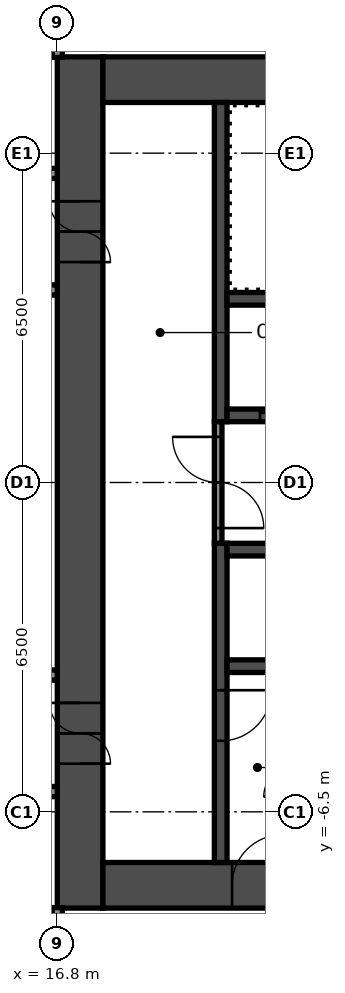
"""IFC4 building model, lengths in metres.
Left out: names, types, materials, properties, quantities, classifications, styles, units other than length and angle.
Written with IfcOpenShell. Run it as: python <this file> out.ifc"""

import sys

from ifc_helpers import new_model, si_unit, direction, frame, frame_2d, origin, place, context, subcontext, project, spatial, rectangle, extrude, element, fill, save


model = new_model("IFC4")
c1 = context("Model", 3, precision=1e-05, world=origin(), true_north=direction((0.0, 1.0)))
c2 = subcontext(c1, "Body", "Model", "MODEL_VIEW")
j1 = project(units=[si_unit("LENGTHUNIT", "METRE"), si_unit("PLANEANGLEUNIT", "RADIAN")], contexts=[c1])
p1 = place(None, origin())
s1 = spatial("IfcSite", under=j1, at=p1, CompositionType="ELEMENT")
p2 = place(p1, origin())
s2 = spatial("IfcBuilding", under=s1, at=p2, CompositionType="ELEMENT")
p3 = place(p2, frame((0.0, 0.0, 23.0)))
s3 = spatial("IfcBuildingStorey", under=s2, at=p3, CompositionType="ELEMENT", Elevation=23.0)
p4 = place(p3, frame((17.25, -8.4, 0.0), z_axis=(0.0, 0.0, 1.0), x_axis=(0.0, 1.0, 0.0)))
e1 = element("IfcWall", 1, at=p4, inside=s3, PredefinedType="SHEAR", context=c2, shape_type="SweptSolid", body=[
    extrude(rectangle(XDim=16.8, YDim=0.9, at=frame_2d((8.4, 0.0))), origin(), (0.0, 0.0, 1.0), 2.8),
])
p5 = place(p4, frame((12.75, 0.0, 0.0)))
e2 = element("IfcOpeningElement", 2, at=p5, cuts=e1, PredefinedType="OPENING", context=c2, shape_type="SweptSolid", body=[
    extrude(rectangle(XDim=1.2, YDim=2.1, at=frame_2d((0.6, 1.05))), frame((0.0, 0.46, 0.0), z_axis=(0.0, -1.0, 0.0), x_axis=(1.0, 0.0, 0.0)), (0.0, 0.0, 1.0), 0.92),
])
p6 = place(p4, frame((2.85, 0.0, 0.0)))
e3 = element("IfcOpeningElement", 3, at=p6, cuts=e1, PredefinedType="OPENING", context=c2, shape_type="SweptSolid", body=[
    extrude(rectangle(XDim=1.2, YDim=2.1, at=frame_2d((0.6, 1.05))), frame((0.0, 0.46, 0.0), z_axis=(0.0, -1.0, 0.0), x_axis=(1.0, 0.0, 0.0)), (0.0, 0.0, 1.0), 0.92),
])
p7 = place(p3, frame((17.7, 7.95, 0.0), z_axis=(0.0, 0.0, 1.0), x_axis=(1.0, 0.0, 0.0)))
e4 = element("IfcWall", 4, at=p7, inside=s3, PredefinedType="SHEAR", context=c2, shape_type="SweptSolid", body=[
    extrude(rectangle(XDim=15.0, YDim=0.9, at=frame_2d((7.5, 0.0))), origin(), (0.0, 0.0, 1.0), 2.8),
])
p8 = place(p7, frame((10.4, 0.0, 0.0)))
e5 = element("IfcOpeningElement", 5, at=p8, cuts=e4, PredefinedType="OPENING", context=c2, shape_type="SweptSolid", body=[
    extrude(rectangle(XDim=1.2, YDim=2.1, at=frame_2d((0.6, 1.05))), frame((0.0, 0.46, 0.0), z_axis=(0.0, -1.0, 0.0), x_axis=(1.0, 0.0, 0.0)), (0.0, 0.0, 1.0), 0.92),
])
p9 = place(p7, frame((13.35, 0.0, 0.0)))
e6 = element("IfcOpeningElement", 6, at=p9, cuts=e4, PredefinedType="OPENING", context=c2, shape_type="SweptSolid", body=[
    extrude(rectangle(XDim=0.9, YDim=2.1, at=frame_2d((0.45, 1.05))), frame((0.0, 0.46, 0.0), z_axis=(0.0, -1.0, 0.0), x_axis=(1.0, 0.0, 0.0)), (0.0, 0.0, 1.0), 0.92),
])
p10 = place(p3, frame((17.7, -7.95, 0.0), z_axis=(0.0, 0.0, 1.0), x_axis=(1.0, 0.0, 0.0)))
e7 = element("IfcWall", 7, at=p10, inside=s3, PredefinedType="SHEAR", context=c2, shape_type="SweptSolid", body=[
    extrude(rectangle(XDim=15.0, YDim=0.9, at=frame_2d((7.5, 0.0))), origin(), (0.0, 0.0, 1.0), 2.8),
])
p11 = place(p10, frame((2.55, 0.0, 0.0)))
e8 = element("IfcOpeningElement", 8, at=p11, cuts=e7, PredefinedType="OPENING", context=c2, shape_type="SweptSolid", body=[
    extrude(rectangle(XDim=1.0, YDim=2.1, at=frame_2d((0.5, 1.05))), frame((0.0, 0.46, 0.0), z_axis=(0.0, -1.0, 0.0), x_axis=(1.0, 0.0, 0.0)), (0.0, 0.0, 1.0), 0.92),
])
p12 = place(p3, frame((20.025, 1.2, 0.0), z_axis=(0.0, 0.0, 1.0), x_axis=(0.0, 1.0, 0.0)))
e9 = element("IfcWall", 9, at=p12, inside=s3, PredefinedType="SHEAR", context=c2, shape_type="SweptSolid", body=[
    extrude(rectangle(XDim=6.3, YDim=0.25, at=frame_2d((3.15, 0.0))), origin(), (0.0, 0.0, 1.0), 2.8),
])
p13 = place(p3, frame((20.025, -7.5, 0.0), z_axis=(0.0, 0.0, 1.0), x_axis=(0.0, 1.0, 0.0)))
e10 = element("IfcWall", 10, at=p13, inside=s3, PredefinedType="SHEAR", context=c2, shape_type="SweptSolid", body=[
    extrude(rectangle(XDim=6.3, YDim=0.25, at=frame_2d((3.15, 0.0))), origin(), (0.0, 0.0, 1.0), 2.8),
])
p14 = place(p13, frame((2.4, 0.0, 0.0)))
e11 = element("IfcOpeningElement", 11, at=p14, cuts=e10, PredefinedType="OPENING", context=c2, shape_type="SweptSolid", body=[
    extrude(rectangle(XDim=1.0, YDim=2.1, at=frame_2d((0.5, 1.05))), frame((0.0, 0.135, 0.0), z_axis=(0.0, -1.0, 0.0), x_axis=(1.0, 0.0, 0.0)), (0.0, 0.0, 1.0), 0.27),
])
p15 = place(p3, frame((20.15, 1.325, 0.0), z_axis=(0.0, 0.0, 1.0), x_axis=(1.0, 0.0, 0.0)))
e12 = element("IfcWall", 12, at=p15, inside=s3, PredefinedType="SHEAR", context=c2, shape_type="SweptSolid", body=[
    extrude(rectangle(XDim=7.5, YDim=0.25, at=frame_2d((3.75, 0.0))), origin(), (0.0, 0.0, 1.0), 2.8),
])
p16 = place(p15, frame((0.65, 0.0, 0.0)))
e13 = element("IfcOpeningElement", 13, at=p16, cuts=e12, PredefinedType="OPENING", context=c2, shape_type="SweptSolid", body=[
    extrude(rectangle(XDim=1.1, YDim=2.1, at=frame_2d((0.55, 1.05))), frame((0.0, 0.135, 0.0), z_axis=(0.0, -1.0, 0.0), x_axis=(1.0, 0.0, 0.0)), (0.0, 0.0, 1.0), 0.27),
])
p17 = place(p15, frame((3.05, 0.0, 0.0)))
e14 = element("IfcOpeningElement", 14, at=p17, cuts=e12, PredefinedType="OPENING", context=c2, shape_type="SweptSolid", body=[
    extrude(rectangle(XDim=1.1, YDim=2.1, at=frame_2d((0.55, 1.05))), frame((0.0, 0.135, 0.0), z_axis=(0.0, -1.0, 0.0), x_axis=(1.0, 0.0, 0.0)), (0.0, 0.0, 1.0), 0.27),
])
p18 = place(p15, frame((5.45, 0.0, 0.0)))
e15 = element("IfcOpeningElement", 15, at=p18, cuts=e12, PredefinedType="OPENING", context=c2, shape_type="SweptSolid", body=[
    extrude(rectangle(XDim=1.1, YDim=2.1, at=frame_2d((0.55, 1.05))), frame((0.0, 0.135, 0.0), z_axis=(0.0, -1.0, 0.0), x_axis=(1.0, 0.0, 0.0)), (0.0, 0.0, 1.0), 0.27),
])
for number, where, z_axis, x_axis in (
    (16, (20.15, 3.625, 0.0), (0.0, 0.0, 1.0), (1.0, 0.0, 0.0)),
    (17, (20.15, -1.325, 0.0), (0.0, 0.0, 1.0), (1.0, 0.0, 0.0)),
    (18, (20.15, -3.625, 0.0), (0.0, 0.0, 1.0), (1.0, 0.0, 0.0)),
):
    element("IfcWall", number, at=place(p3, frame(where, z_axis=z_axis, x_axis=x_axis)), inside=s3, PredefinedType="SHEAR", context=c2, shape_type="SweptSolid", body=[
        extrude(rectangle(XDim=7.5, YDim=0.25, at=frame_2d((3.75, 0.0))), origin(), (0.0, 0.0, 1.0), 2.8),
    ])
p19 = place(p3, frame((19.975, -1.2, 0.0), z_axis=(0.0, 0.0, 1.0), x_axis=(0.0, 1.0, 0.0)))
e19 = element("IfcWall", 19, at=p19, inside=s3, PredefinedType="PARTITIONING", context=c2, shape_type="SweptSolid", body=[
    extrude(rectangle(XDim=2.4, YDim=0.15, at=frame_2d((1.2, 0.0))), origin(), (0.0, 0.0, 1.0), 2.8),
])
p20 = place(p19, frame((0.3, 0.0, 0.0)))
e20 = element("IfcOpeningElement", 20, at=p20, cuts=e19, PredefinedType="OPENING", context=c2, shape_type="SweptSolid", body=[
    extrude(rectangle(XDim=1.8, YDim=2.1, at=frame_2d((0.9, 1.05))), frame((0.0, 0.085, 0.0), z_axis=(0.0, -1.0, 0.0), x_axis=(1.0, 0.0, 0.0)), (0.0, 0.0, 1.0), 0.17),
])
p21 = place(p3, frame((-16.8, -6.1, 0.0), z_axis=(0.0, 0.0, 1.0), x_axis=(1.0, 0.0, 0.0)))
e21 = element("IfcWall", 21, at=p21, inside=s3, PredefinedType="PARTITIONING", context=c2, shape_type="SweptSolid", body=[
    extrude(rectangle(XDim=33.6, YDim=0.2, at=frame_2d((16.8, 0.0))), origin(), (0.0, 0.0, 1.0), 2.8),
])
p22 = place(p21, frame((2.85, 0.0, 0.0)))
e22 = element("IfcOpeningElement", 22, at=p22, cuts=e21, PredefinedType="OPENING", context=c2, shape_type="SweptSolid", body=[
    extrude(rectangle(XDim=1.0, YDim=2.1, at=frame_2d((0.5, 1.05))), frame((0.0, 0.11, 0.0), z_axis=(0.0, -1.0, 0.0), x_axis=(1.0, 0.0, 0.0)), (0.0, 0.0, 1.0), 0.22),
])
p23 = place(p21, frame((4.55, 0.0, 0.0)))
e23 = element("IfcOpeningElement", 23, at=p23, cuts=e21, PredefinedType="OPENING", context=c2, shape_type="SweptSolid", body=[
    extrude(rectangle(XDim=1.0, YDim=2.1, at=frame_2d((0.5, 1.05))), frame((0.0, 0.11, 0.0), z_axis=(0.0, -1.0, 0.0), x_axis=(1.0, 0.0, 0.0)), (0.0, 0.0, 1.0), 0.22),
])
p24 = place(p21, frame((11.25, 0.0, 0.0)))
e24 = element("IfcOpeningElement", 24, at=p24, cuts=e21, PredefinedType="OPENING", context=c2, shape_type="SweptSolid", body=[
    extrude(rectangle(XDim=1.0, YDim=2.1, at=frame_2d((0.5, 1.05))), frame((0.0, 0.11, 0.0), z_axis=(0.0, -1.0, 0.0), x_axis=(1.0, 0.0, 0.0)), (0.0, 0.0, 1.0), 0.22),
])
p25 = place(p21, frame((12.95, 0.0, 0.0)))
e25 = element("IfcOpeningElement", 25, at=p25, cuts=e21, PredefinedType="OPENING", context=c2, shape_type="SweptSolid", body=[
    extrude(rectangle(XDim=1.0, YDim=2.1, at=frame_2d((0.5, 1.05))), frame((0.0, 0.11, 0.0), z_axis=(0.0, -1.0, 0.0), x_axis=(1.0, 0.0, 0.0)), (0.0, 0.0, 1.0), 0.22),
])
p26 = place(p21, frame((20.5, 0.0, 0.0)))
e26 = element("IfcOpeningElement", 26, at=p26, cuts=e21, PredefinedType="OPENING", context=c2, shape_type="SweptSolid", body=[
    extrude(rectangle(XDim=1.0, YDim=2.1, at=frame_2d((0.5, 1.05))), frame((0.0, 0.11, 0.0), z_axis=(0.0, -1.0, 0.0), x_axis=(1.0, 0.0, 0.0)), (0.0, 0.0, 1.0), 0.22),
])
p27 = place(p21, frame((28.05, 0.0, 0.0)))
e27 = element("IfcOpeningElement", 27, at=p27, cuts=e21, PredefinedType="OPENING", context=c2, shape_type="SweptSolid", body=[
    extrude(rectangle(XDim=1.0, YDim=2.1, at=frame_2d((0.5, 1.05))), frame((0.0, 0.11, 0.0), z_axis=(0.0, -1.0, 0.0), x_axis=(1.0, 0.0, 0.0)), (0.0, 0.0, 1.0), 0.22),
])
p28 = place(p21, frame((29.75, 0.0, 0.0)))
e28 = element("IfcOpeningElement", 28, at=p28, cuts=e21, PredefinedType="OPENING", context=c2, shape_type="SweptSolid", body=[
    extrude(rectangle(XDim=1.0, YDim=2.1, at=frame_2d((0.5, 1.05))), frame((0.0, 0.11, 0.0), z_axis=(0.0, -1.0, 0.0), x_axis=(1.0, 0.0, 0.0)), (0.0, 0.0, 1.0), 0.22),
])
p29 = place(p3, frame((-16.8, -3.8, 0.0), z_axis=(0.0, 0.0, 1.0), x_axis=(1.0, 0.0, 0.0)))
e29 = element("IfcWall", 29, at=p29, inside=s3, PredefinedType="PARTITIONING", context=c2, shape_type="SweptSolid", body=[
    extrude(rectangle(XDim=33.6, YDim=0.2, at=frame_2d((16.8, 0.0))), origin(), (0.0, 0.0, 1.0), 2.8),
])
p30 = place(p29, frame((10.64, 0.0, 0.0)))
e30 = element("IfcOpeningElement", 30, at=p30, cuts=e29, PredefinedType="OPENING", context=c2, shape_type="SweptSolid", body=[
    extrude(rectangle(XDim=0.9, YDim=2.1, at=frame_2d((0.45, 1.05))), frame((0.0, 0.11, 0.0), z_axis=(0.0, -1.0, 0.0), x_axis=(1.0, 0.0, 0.0)), (0.0, 0.0, 1.0), 0.22),
])
p31 = place(p29, frame((14.84, 0.0, 0.0)))
e31 = element("IfcOpeningElement", 31, at=p31, cuts=e29, PredefinedType="OPENING", context=c2, shape_type="SweptSolid", body=[
    extrude(rectangle(XDim=0.9, YDim=2.1, at=frame_2d((0.45, 1.05))), frame((0.0, 0.11, 0.0), z_axis=(0.0, -1.0, 0.0), x_axis=(1.0, 0.0, 0.0)), (0.0, 0.0, 1.0), 0.22),
])
p32 = place(p29, frame((26.26, 0.0, 0.0)))
e32 = element("IfcOpeningElement", 32, at=p32, cuts=e29, PredefinedType="OPENING", context=c2, shape_type="SweptSolid", body=[
    extrude(rectangle(XDim=0.9, YDim=2.1, at=frame_2d((0.45, 1.05))), frame((0.0, 0.11, 0.0), z_axis=(0.0, -1.0, 0.0), x_axis=(1.0, 0.0, 0.0)), (0.0, 0.0, 1.0), 0.22),
])
p33 = place(p29, frame((30.46, 0.0, 0.0)))
e33 = element("IfcOpeningElement", 33, at=p33, cuts=e29, PredefinedType="OPENING", context=c2, shape_type="SweptSolid", body=[
    extrude(rectangle(XDim=0.9, YDim=2.1, at=frame_2d((0.45, 1.05))), frame((0.0, 0.11, 0.0), z_axis=(0.0, -1.0, 0.0), x_axis=(1.0, 0.0, 0.0)), (0.0, 0.0, 1.0), 0.22),
])
p34 = place(p3, frame((-16.8, 3.8, 0.0), z_axis=(0.0, 0.0, 1.0), x_axis=(1.0, 0.0, 0.0)))
e34 = element("IfcWall", 34, at=p34, inside=s3, PredefinedType="PARTITIONING", context=c2, shape_type="SweptSolid", body=[
    extrude(rectangle(XDim=33.6, YDim=0.2, at=frame_2d((16.8, 0.0))), origin(), (0.0, 0.0, 1.0), 2.8),
])
p35 = place(p34, frame((2.155, 0.0, 0.0)))
e35 = element("IfcOpeningElement", 35, at=p35, cuts=e34, PredefinedType="OPENING", context=c2, shape_type="SweptSolid", body=[
    extrude(rectangle(XDim=0.9, YDim=2.1, at=frame_2d((0.45, 1.05))), frame((0.0, 0.11, 0.0), z_axis=(0.0, -1.0, 0.0), x_axis=(1.0, 0.0, 0.0)), (0.0, 0.0, 1.0), 0.22),
])
p36 = place(p34, frame((6.355, 0.0, 0.0)))
e36 = element("IfcOpeningElement", 36, at=p36, cuts=e34, PredefinedType="OPENING", context=c2, shape_type="SweptSolid", body=[
    extrude(rectangle(XDim=0.9, YDim=2.1, at=frame_2d((0.45, 1.05))), frame((0.0, 0.11, 0.0), z_axis=(0.0, -1.0, 0.0), x_axis=(1.0, 0.0, 0.0)), (0.0, 0.0, 1.0), 0.22),
])
p37 = place(p34, frame((18.28, 0.0, 0.0)))
e37 = element("IfcOpeningElement", 37, at=p37, cuts=e34, PredefinedType="OPENING", context=c2, shape_type="SweptSolid", body=[
    extrude(rectangle(XDim=0.9, YDim=2.1, at=frame_2d((0.45, 1.05))), frame((0.0, 0.11, 0.0), z_axis=(0.0, -1.0, 0.0), x_axis=(1.0, 0.0, 0.0)), (0.0, 0.0, 1.0), 0.22),
])
p38 = place(p34, frame((22.48, 0.0, 0.0)))
e38 = element("IfcOpeningElement", 38, at=p38, cuts=e34, PredefinedType="OPENING", context=c2, shape_type="SweptSolid", body=[
    extrude(rectangle(XDim=0.9, YDim=2.1, at=frame_2d((0.45, 1.05))), frame((0.0, 0.11, 0.0), z_axis=(0.0, -1.0, 0.0), x_axis=(1.0, 0.0, 0.0)), (0.0, 0.0, 1.0), 0.22),
])
p39 = place(p3, frame((-16.8, 6.1, 0.0), z_axis=(0.0, 0.0, 1.0), x_axis=(1.0, 0.0, 0.0)))
e39 = element("IfcWall", 39, at=p39, inside=s3, PredefinedType="PARTITIONING", context=c2, shape_type="SweptSolid", body=[
    extrude(rectangle(XDim=33.6, YDim=0.2, at=frame_2d((16.8, 0.0))), origin(), (0.0, 0.0, 1.0), 2.8),
])
p40 = place(p39, frame((2.85, 0.0, 0.0)))
e40 = element("IfcOpeningElement", 40, at=p40, cuts=e39, PredefinedType="OPENING", context=c2, shape_type="SweptSolid", body=[
    extrude(rectangle(XDim=1.0, YDim=2.1, at=frame_2d((0.5, 1.05))), frame((0.0, 0.11, 0.0), z_axis=(0.0, -1.0, 0.0), x_axis=(1.0, 0.0, 0.0)), (0.0, 0.0, 1.0), 0.22),
])
p41 = place(p39, frame((4.55, 0.0, 0.0)))
e41 = element("IfcOpeningElement", 41, at=p41, cuts=e39, PredefinedType="OPENING", context=c2, shape_type="SweptSolid", body=[
    extrude(rectangle(XDim=1.0, YDim=2.1, at=frame_2d((0.5, 1.05))), frame((0.0, 0.11, 0.0), z_axis=(0.0, -1.0, 0.0), x_axis=(1.0, 0.0, 0.0)), (0.0, 0.0, 1.0), 0.22),
])
p42 = place(p39, frame((9.545, 0.0, 0.0)))
e42 = element("IfcOpeningElement", 42, at=p42, cuts=e39, PredefinedType="OPENING", context=c2, shape_type="SweptSolid", body=[
    extrude(rectangle(XDim=0.9, YDim=2.1, at=frame_2d((0.45, 1.05))), frame((0.0, 0.11, 0.0), z_axis=(0.0, -1.0, 0.0), x_axis=(1.0, 0.0, 0.0)), (0.0, 0.0, 1.0), 0.22),
])
p43 = place(p39, frame((13.745, 0.0, 0.0)))
e43 = element("IfcOpeningElement", 43, at=p43, cuts=e39, PredefinedType="OPENING", context=c2, shape_type="SweptSolid", body=[
    extrude(rectangle(XDim=0.9, YDim=2.1, at=frame_2d((0.45, 1.05))), frame((0.0, 0.11, 0.0), z_axis=(0.0, -1.0, 0.0), x_axis=(1.0, 0.0, 0.0)), (0.0, 0.0, 1.0), 0.22),
])
p44 = place(p39, frame((19.65, 0.0, 0.0)))
e44 = element("IfcOpeningElement", 44, at=p44, cuts=e39, PredefinedType="OPENING", context=c2, shape_type="SweptSolid", body=[
    extrude(rectangle(XDim=1.0, YDim=2.1, at=frame_2d((0.5, 1.05))), frame((0.0, 0.11, 0.0), z_axis=(0.0, -1.0, 0.0), x_axis=(1.0, 0.0, 0.0)), (0.0, 0.0, 1.0), 0.22),
])
p45 = place(p39, frame((21.35, 0.0, 0.0)))
e45 = element("IfcOpeningElement", 45, at=p45, cuts=e39, PredefinedType="OPENING", context=c2, shape_type="SweptSolid", body=[
    extrude(rectangle(XDim=1.0, YDim=2.1, at=frame_2d((0.5, 1.05))), frame((0.0, 0.11, 0.0), z_axis=(0.0, -1.0, 0.0), x_axis=(1.0, 0.0, 0.0)), (0.0, 0.0, 1.0), 0.22),
])
p46 = place(p39, frame((28.05, 0.0, 0.0)))
e46 = element("IfcOpeningElement", 46, at=p46, cuts=e39, PredefinedType="OPENING", context=c2, shape_type="SweptSolid", body=[
    extrude(rectangle(XDim=1.0, YDim=2.1, at=frame_2d((0.5, 1.05))), frame((0.0, 0.11, 0.0), z_axis=(0.0, -1.0, 0.0), x_axis=(1.0, 0.0, 0.0)), (0.0, 0.0, 1.0), 0.22),
])
p47 = place(p39, frame((29.75, 0.0, 0.0)))
e47 = element("IfcOpeningElement", 47, at=p47, cuts=e39, PredefinedType="OPENING", context=c2, shape_type="SweptSolid", body=[
    extrude(rectangle(XDim=1.0, YDim=2.1, at=frame_2d((0.5, 1.05))), frame((0.0, 0.11, 0.0), z_axis=(0.0, -1.0, 0.0), x_axis=(1.0, 0.0, 0.0)), (0.0, 0.0, 1.0), 0.22),
])
for number, where, z_axis, x_axis in (
    (48, (16.8, -20.3, 0.0), (0.0, 0.0, 1.0), (0.0, 1.0, 0.0)),
    (49, (16.8, 8.39, 0.0), (0.0, 0.0, 1.0), (0.0, 1.0, 0.0)),
):
    element("IfcWall", number, at=place(p3, frame(where, z_axis=z_axis, x_axis=x_axis)), inside=s3, PredefinedType="PARTITIONING", context=c2, shape_type="SweptSolid", body=[
        extrude(rectangle(XDim=11.91, YDim=0.2, at=frame_2d((5.955, 0.0))), origin(), (0.0, 0.0, 1.0), 2.8),
    ])
p48 = place(p5, origin())
e50 = element("IfcDoor", 50, at=p48, inside=s3, OperationType="DOUBLE_DOOR_SINGLE_SWING", PredefinedType="DOOR", context=c2, shape_type="SweptSolid", body=[
    extrude(rectangle(XDim=1.2, YDim=2.1, at=frame_2d((0.6, 1.05))), frame((0.0, 0.025, 0.0), z_axis=(0.0, -1.0, 0.0), x_axis=(1.0, 0.0, 0.0)), (0.0, 0.0, 1.0), 0.05),
])
fill(e2, e50)
p49 = place(p6, origin())
e51 = element("IfcDoor", 51, at=p49, inside=s3, OperationType="DOUBLE_DOOR_SINGLE_SWING", PredefinedType="DOOR", context=c2, shape_type="SweptSolid", body=[
    extrude(rectangle(XDim=1.2, YDim=2.1, at=frame_2d((0.6, 1.05))), frame((0.0, 0.025, 0.0), z_axis=(0.0, -1.0, 0.0), x_axis=(1.0, 0.0, 0.0)), (0.0, 0.0, 1.0), 0.05),
])
fill(e3, e51)
p50 = place(p11, origin())
e52 = element("IfcDoor", 52, at=p50, inside=s3, OperationType="SINGLE_SWING_LEFT", PredefinedType="DOOR", context=c2, shape_type="SweptSolid", body=[
    extrude(rectangle(XDim=1.0, YDim=2.1, at=frame_2d((0.5, 1.05))), frame((0.0, 0.025, 0.0), z_axis=(0.0, -1.0, 0.0), x_axis=(1.0, 0.0, 0.0)), (0.0, 0.0, 1.0), 0.05),
])
fill(e8, e52)
p51 = place(p14, origin())
e53 = element("IfcDoor", 53, at=p51, inside=s3, OperationType="SINGLE_SWING_RIGHT", PredefinedType="DOOR", context=c2, shape_type="SweptSolid", body=[
    extrude(rectangle(XDim=1.0, YDim=2.1, at=frame_2d((0.5, 1.05))), frame((0.0, 0.025, 0.0), z_axis=(0.0, -1.0, 0.0), x_axis=(1.0, 0.0, 0.0)), (0.0, 0.0, 1.0), 0.05),
])
fill(e11, e53)
p52 = place(p20, origin())
e54 = element("IfcDoor", 54, at=p52, inside=s3, OperationType="DOUBLE_DOOR_SINGLE_SWING", PredefinedType="DOOR", context=c2, shape_type="SweptSolid", body=[
    extrude(rectangle(XDim=1.8, YDim=2.1, at=frame_2d((0.9, 1.05))), frame((0.0, 0.025, 0.0), z_axis=(0.0, -1.0, 0.0), x_axis=(1.0, 0.0, 0.0)), (0.0, 0.0, 1.0), 0.05),
])
fill(e20, e54)
p53 = place(p16, origin())
e55 = element("IfcDoor", 55, at=p53, inside=s3, OperationType="DOUBLE_DOOR_SLIDING", PredefinedType="DOOR", context=c2, shape_type="SweptSolid", body=[
    extrude(rectangle(XDim=1.1, YDim=2.1, at=frame_2d((0.55, 1.05))), frame((0.0, 0.025, 0.0), z_axis=(0.0, -1.0, 0.0), x_axis=(1.0, 0.0, 0.0)), (0.0, 0.0, 1.0), 0.05),
])
fill(e13, e55)
save(model, sys.argv[1])
